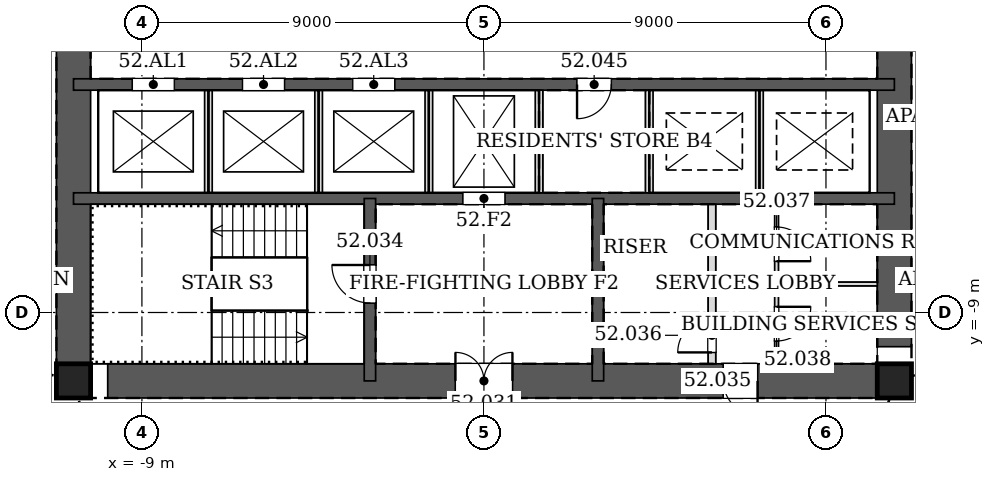
"""IFC4 building model, lengths in metres.
Left out: names, types, materials, properties, quantities, classifications, styles, units other than length and angle.
Written with IfcOpenShell. Run it as: python <this file> out.ifc"""

import sys

from ifc_helpers import new_model, si_unit, direction, frame, frame_2d, origin, origin_2d, place, context, subcontext, project, spatial, rectangle, hollow_rectangle, extrude, element, fill, save


model = new_model("IFC4")
c1 = context("Model", 3, precision=1e-05, world=origin(), true_north=direction((0.0, 1.0)))
c2 = subcontext(c1, "Body", "Model", "MODEL_VIEW")
j1 = project(units=[si_unit("LENGTHUNIT", "METRE"), si_unit("PLANEANGLEUNIT", "RADIAN")], contexts=[c1])
p1 = place(None, origin())
s1 = spatial("IfcSite", under=j1, at=p1, CompositionType="ELEMENT")
p2 = place(p1, origin())
s2 = spatial("IfcBuilding", under=s1, at=p2, CompositionType="ELEMENT")
p3 = place(p2, frame((0.0, 0.0, 224.4)))
s3 = spatial("IfcBuildingStorey", under=s2, at=p3, CompositionType="ELEMENT", Elevation=224.4)
for number, where, z_axis, x_axis in (
    (1, (-10.8, -10.8, 0.0), (0.0, 0.0, 1.0), (1.0, 0.0, 0.0)),
    (2, (10.8, -10.8, 0.0), (0.0, 0.0, 1.0), (1.0, 0.0, 0.0)),
):
    element("IfcColumn", number, at=place(p3, frame(where, z_axis=z_axis, x_axis=x_axis)), inside=s3, PredefinedType="COLUMN", context=c2, shape_type="SweptSolid", body=[
        extrude(hollow_rectangle(XDim=0.9, YDim=0.9, WallThickness=0.05, at=origin_2d()), origin(), (0.0, 0.0, 1.0), 3.4),
    ])
p4 = place(p3, frame((-10.8, -10.8, 0.0), z_axis=(0.0, 0.0, 1.0), x_axis=(1.0, 0.0, 0.0)))
e3 = element("IfcWall", 3, at=p4, inside=s3, PredefinedType="SOLIDWALL", context=c2, shape_type="SweptSolid", body=[
    extrude(rectangle(XDim=21.6, YDim=0.9, at=frame_2d((10.8, 0.0))), origin(), (0.0, 0.0, 1.0), 3.4),
])
p5 = place(p4, frame((10.05, 0.0, 0.0)))
e4 = element("IfcOpeningElement", 4, at=p5, cuts=e3, PredefinedType="OPENING", context=c2, shape_type="SweptSolid", body=[
    extrude(rectangle(XDim=1.5, YDim=2.1, at=frame_2d((0.75, 1.05))), frame((0.0, 0.46, 0.0), z_axis=(0.0, -1.0, 0.0), x_axis=(1.0, 0.0, 0.0)), (0.0, 0.0, 1.0), 0.92),
])
p6 = place(p4, frame((17.1, 0.0, 0.0)))
e5 = element("IfcOpeningElement", 5, at=p6, cuts=e3, PredefinedType="OPENING", context=c2, shape_type="SweptSolid", body=[
    extrude(rectangle(XDim=0.9, YDim=2.1, at=frame_2d((0.45, 1.05))), frame((0.0, 0.46, 0.0), z_axis=(0.0, -1.0, 0.0), x_axis=(1.0, 0.0, 0.0)), (0.0, 0.0, 1.0), 0.92),
])
p7 = place(p3, frame((10.8, -10.8, 0.0), z_axis=(0.0, 0.0, 1.0), x_axis=(0.0, 1.0, 0.0)))
e6 = element("IfcWall", 6, at=p7, inside=s3, PredefinedType="SOLIDWALL", context=c2, shape_type="SweptSolid", body=[
    extrude(rectangle(XDim=21.6, YDim=0.9, at=frame_2d((10.8, 0.0))), origin(), (0.0, 0.0, 1.0), 3.4),
])
p8 = place(p7, frame((11.7, 0.0, 0.0)))
e7 = element("IfcOpeningElement", 7, at=p8, cuts=e6, PredefinedType="OPENING", context=c2, shape_type="SweptSolid", body=[
    extrude(rectangle(XDim=1.2, YDim=2.1, at=frame_2d((0.6, 1.05))), frame((0.0, 0.46, 0.0), z_axis=(0.0, -1.0, 0.0), x_axis=(1.0, 0.0, 0.0)), (0.0, 0.0, 1.0), 0.92),
])
p9 = place(p7, frame((8.7, 0.0, 0.0)))
e8 = element("IfcOpeningElement", 8, at=p9, cuts=e6, PredefinedType="OPENING", context=c2, shape_type="SweptSolid", body=[
    extrude(rectangle(XDim=1.2, YDim=2.1, at=frame_2d((0.6, 1.05))), frame((0.0, 0.46, 0.0), z_axis=(0.0, -1.0, 0.0), x_axis=(1.0, 0.0, 0.0)), (0.0, 0.0, 1.0), 0.92),
])
p10 = place(p3, frame((-10.8, 10.8, 0.0), z_axis=(0.0, 0.0, 1.0), x_axis=(0.0, -1.0, 0.0)))
e9 = element("IfcWall", 9, at=p10, inside=s3, PredefinedType="SOLIDWALL", context=c2, shape_type="SweptSolid", body=[
    extrude(rectangle(XDim=21.6, YDim=0.9, at=frame_2d((10.8, 0.0))), origin(), (0.0, 0.0, 1.0), 3.4),
])
p11 = place(p10, frame((8.7, 0.0, 0.0)))
e10 = element("IfcOpeningElement", 10, at=p11, cuts=e9, PredefinedType="OPENING", context=c2, shape_type="SweptSolid", body=[
    extrude(rectangle(XDim=1.2, YDim=2.1, at=frame_2d((0.6, 1.05))), frame((0.0, 0.46, 0.0), z_axis=(0.0, -1.0, 0.0), x_axis=(1.0, 0.0, 0.0)), (0.0, 0.0, 1.0), 0.92),
])
p12 = place(p10, frame((11.7, 0.0, 0.0)))
e11 = element("IfcOpeningElement", 11, at=p12, cuts=e9, PredefinedType="OPENING", context=c2, shape_type="SweptSolid", body=[
    extrude(rectangle(XDim=1.2, YDim=2.1, at=frame_2d((0.6, 1.05))), frame((0.0, 0.46, 0.0), z_axis=(0.0, -1.0, 0.0), x_axis=(1.0, 0.0, 0.0)), (0.0, 0.0, 1.0), 0.92),
])
p13 = place(p3, frame((-10.8, -3.0, 0.0), z_axis=(0.0, 0.0, 1.0), x_axis=(1.0, 0.0, 0.0)))
e12 = element("IfcWall", 12, at=p13, inside=s3, PredefinedType="SOLIDWALL", context=c2, shape_type="SweptSolid", body=[
    extrude(rectangle(XDim=21.6, YDim=0.3, at=frame_2d((10.8, 0.0))), origin(), (0.0, 0.0, 1.0), 3.4),
])
p14 = place(p13, frame((13.25, 0.0, 0.0)))
e13 = element("IfcOpeningElement", 13, at=p14, cuts=e12, PredefinedType="OPENING", context=c2, shape_type="SweptSolid", body=[
    extrude(rectangle(XDim=0.9, YDim=2.1, at=frame_2d((0.45, 1.05))), frame((0.0, 0.16, 0.0), z_axis=(0.0, -1.0, 0.0), x_axis=(1.0, 0.0, 0.0)), (0.0, 0.0, 1.0), 0.32),
])
p15 = place(p13, frame((1.55, 0.0, 0.0)))
e14 = element("IfcOpeningElement", 14, at=p15, cuts=e12, PredefinedType="OPENING", context=c2, shape_type="SweptSolid", body=[
    extrude(rectangle(XDim=1.1, YDim=2.1, at=frame_2d((0.55, 1.05))), frame((0.0, 0.16, 0.0), z_axis=(0.0, -1.0, 0.0), x_axis=(1.0, 0.0, 0.0)), (0.0, 0.0, 1.0), 0.32),
])
p16 = place(p13, frame((4.45, 0.0, 0.0)))
e15 = element("IfcOpeningElement", 15, at=p16, cuts=e12, PredefinedType="OPENING", context=c2, shape_type="SweptSolid", body=[
    extrude(rectangle(XDim=1.1, YDim=2.1, at=frame_2d((0.55, 1.05))), frame((0.0, 0.16, 0.0), z_axis=(0.0, -1.0, 0.0), x_axis=(1.0, 0.0, 0.0)), (0.0, 0.0, 1.0), 0.32),
])
p17 = place(p13, frame((7.35, 0.0, 0.0)))
e16 = element("IfcOpeningElement", 16, at=p17, cuts=e12, PredefinedType="OPENING", context=c2, shape_type="SweptSolid", body=[
    extrude(rectangle(XDim=1.1, YDim=2.1, at=frame_2d((0.55, 1.05))), frame((0.0, 0.16, 0.0), z_axis=(0.0, -1.0, 0.0), x_axis=(1.0, 0.0, 0.0)), (0.0, 0.0, 1.0), 0.32),
])
p18 = place(p3, frame((-10.8, -6.0, 0.0), z_axis=(0.0, 0.0, 1.0), x_axis=(1.0, 0.0, 0.0)))
e17 = element("IfcWall", 17, at=p18, inside=s3, PredefinedType="SOLIDWALL", context=c2, shape_type="SweptSolid", body=[
    extrude(rectangle(XDim=21.6, YDim=0.3, at=frame_2d((10.8, 0.0))), origin(), (0.0, 0.0, 1.0), 3.4),
])
p19 = place(p18, frame((10.25, 0.0, 0.0)))
e18 = element("IfcOpeningElement", 18, at=p19, cuts=e17, PredefinedType="OPENING", context=c2, shape_type="SweptSolid", body=[
    extrude(rectangle(XDim=1.1, YDim=2.1, at=frame_2d((0.55, 1.05))), frame((0.0, 0.16, 0.0), z_axis=(0.0, -1.0, 0.0), x_axis=(1.0, 0.0, 0.0)), (0.0, 0.0, 1.0), 0.32),
])
p20 = place(p3, frame((-3.0, -6.0, 0.0), z_axis=(0.0, 0.0, 1.0), x_axis=(0.0, -1.0, 0.0)))
e19 = element("IfcWall", 19, at=p20, inside=s3, PredefinedType="SOLIDWALL", context=c2, shape_type="SweptSolid", body=[
    extrude(rectangle(XDim=4.8, YDim=0.3, at=frame_2d((2.4, 0.0))), origin(), (0.0, 0.0, 1.0), 3.4),
])
p21 = place(p20, frame((1.75, 0.0, 0.0)))
e20 = element("IfcOpeningElement", 20, at=p21, cuts=e19, PredefinedType="OPENING", context=c2, shape_type="SweptSolid", body=[
    extrude(rectangle(XDim=1.0, YDim=2.1, at=frame_2d((0.5, 1.05))), frame((0.0, 0.16, 0.0), z_axis=(0.0, -1.0, 0.0), x_axis=(1.0, 0.0, 0.0)), (0.0, 0.0, 1.0), 0.32),
])
p22 = place(p3, frame((3.0, -6.0, 0.0), z_axis=(0.0, 0.0, 1.0), x_axis=(0.0, -1.0, 0.0)))
e21 = element("IfcWall", 21, at=p22, inside=s3, PredefinedType="SOLIDWALL", context=c2, shape_type="SweptSolid", body=[
    extrude(rectangle(XDim=4.8, YDim=0.3, at=frame_2d((2.4, 0.0))), origin(), (0.0, 0.0, 1.0), 3.4),
])
for number, where, z_axis, x_axis in (
    (22, (-7.25, -5.85, 0.0), (0.0, 0.0, 1.0), (0.0, 1.0, 0.0)),
    (23, (-4.35, -5.85, 0.0), (0.0, 0.0, 1.0), (0.0, 1.0, 0.0)),
    (24, (-1.45, -5.85, 0.0), (0.0, 0.0, 1.0), (0.0, 1.0, 0.0)),
):
    element("IfcWall", number, at=place(p3, frame(where, z_axis=z_axis, x_axis=x_axis)), inside=s3, PredefinedType="PARTITIONING", context=c2, shape_type="SweptSolid", body=[
        extrude(rectangle(XDim=2.7, YDim=0.2, at=frame_2d((1.35, 0.0))), origin(), (0.0, 0.0, 1.0), 3.4),
    ])
for number, where, z_axis, x_axis in (
    (25, (1.45, -5.85, 0.0), (0.0, 0.0, 1.0), (0.0, 1.0, 0.0)),
    (26, (4.35, -5.85, 0.0), (0.0, 0.0, 1.0), (0.0, 1.0, 0.0)),
):
    element("IfcWall", number, at=place(p3, frame(where, z_axis=z_axis, x_axis=x_axis)), inside=s3, PredefinedType="PARTITIONING", context=c2, shape_type="SweptSolid", body=[
        extrude(rectangle(XDim=2.7, YDim=0.2, at=frame_2d((1.35, 0.0))), origin(), (0.0, 0.0, 1.0), 3.2),
    ])
p23 = place(p3, frame((7.25, -5.85, 0.0), z_axis=(0.0, 0.0, 1.0), x_axis=(0.0, 1.0, 0.0)))
e27 = element("IfcWall", 27, at=p23, inside=s3, PredefinedType="PARTITIONING", context=c2, shape_type="SweptSolid", body=[
    extrude(rectangle(XDim=2.7, YDim=0.2, at=frame_2d((1.35, 0.0))), origin(), (0.0, 0.0, 1.0), 3.4),
])
p24 = place(p3, frame((6.0, -10.35, 0.0), z_axis=(0.0, 0.0, 1.0), x_axis=(0.0, 1.0, 0.0)))
e28 = element("IfcWall", 28, at=p24, inside=s3, PredefinedType="PARTITIONING", context=c2, shape_type="SweptSolid", body=[
    extrude(rectangle(XDim=4.2, YDim=0.2, at=frame_2d((2.1, 0.0))), origin(), (0.0, 0.0, 1.0), 3.2),
])
p25 = place(p24, frame((0.3, 0.0, 0.0)))
e29 = element("IfcOpeningElement", 29, at=p25, cuts=e28, PredefinedType="OPENING", context=c2, shape_type="SweptSolid", body=[
    extrude(rectangle(XDim=0.9, YDim=2.1, at=frame_2d((0.45, 1.05))), frame((0.0, 0.11, 0.0), z_axis=(0.0, -1.0, 0.0), x_axis=(1.0, 0.0, 0.0)), (0.0, 0.0, 1.0), 0.22),
])
p26 = place(p3, frame((7.7, -10.35, 0.0), z_axis=(0.0, 0.0, 1.0), x_axis=(0.0, 1.0, 0.0)))
e30 = element("IfcWall", 30, at=p26, inside=s3, PredefinedType="PARTITIONING", context=c2, shape_type="SweptSolid", body=[
    extrude(rectangle(XDim=4.2, YDim=0.1, at=frame_2d((2.1, 0.0))), origin(), (0.0, 0.0, 1.0), 3.2),
])
p27 = place(p26, frame((2.7, 0.0, 0.0)))
e31 = element("IfcOpeningElement", 31, at=p27, cuts=e30, PredefinedType="OPENING", context=c2, shape_type="SweptSolid", body=[
    extrude(rectangle(XDim=0.9, YDim=2.1, at=frame_2d((0.45, 1.05))), frame((0.0, 0.06, 0.0), z_axis=(0.0, -1.0, 0.0), x_axis=(1.0, 0.0, 0.0)), (0.0, 0.0, 1.0), 0.12),
])
p28 = place(p26, frame((0.6, 0.0, 0.0)))
e32 = element("IfcOpeningElement", 32, at=p28, cuts=e30, PredefinedType="OPENING", context=c2, shape_type="SweptSolid", body=[
    extrude(rectangle(XDim=0.9, YDim=2.1, at=frame_2d((0.45, 1.05))), frame((0.0, 0.06, 0.0), z_axis=(0.0, -1.0, 0.0), x_axis=(1.0, 0.0, 0.0)), (0.0, 0.0, 1.0), 0.12),
])
p29 = place(p3, frame((7.7, -8.25, 0.0), z_axis=(0.0, 0.0, 1.0), x_axis=(1.0, 0.0, 0.0)))
e33 = element("IfcWall", 33, at=p29, inside=s3, PredefinedType="PARTITIONING", context=c2, shape_type="SweptSolid", body=[
    extrude(rectangle(XDim=2.65, YDim=0.1, at=frame_2d((1.325, 0.0))), origin(), (0.0, 0.0, 1.0), 3.2),
])
p30 = place(p5, origin())
e34 = element("IfcDoor", 34, at=p30, inside=s3, OperationType="DOUBLE_DOOR_SINGLE_SWING", PredefinedType="DOOR", context=c2, shape_type="SweptSolid", body=[
    extrude(rectangle(XDim=1.5, YDim=2.1, at=frame_2d((0.75, 1.05))), frame((0.0, 0.025, 0.0), z_axis=(0.0, -1.0, 0.0), x_axis=(1.0, 0.0, 0.0)), (0.0, 0.0, 1.0), 0.05),
])
fill(e4, e34)
p31 = place(p21, frame((1.0, 0.0, 0.0), z_axis=(0.0, 0.0, 1.0), x_axis=(-1.0, 0.0, 0.0)))
e35 = element("IfcDoor", 35, at=p31, inside=s3, OperationType="SINGLE_SWING_RIGHT", PredefinedType="DOOR", context=c2, shape_type="SweptSolid", body=[
    extrude(rectangle(XDim=1.0, YDim=2.1, at=frame_2d((0.5, 1.05))), frame((0.0, 0.025, 0.0), z_axis=(0.0, -1.0, 0.0), x_axis=(1.0, 0.0, 0.0)), (0.0, 0.0, 1.0), 0.05),
])
fill(e20, e35)
p32 = place(p6, frame((0.9, 0.0, 0.0), z_axis=(0.0, 0.0, 1.0), x_axis=(-1.0, 0.0, 0.0)))
e36 = element("IfcDoor", 36, at=p32, inside=s3, OperationType="SINGLE_SWING_LEFT", PredefinedType="DOOR", context=c2, shape_type="SweptSolid", body=[
    extrude(rectangle(XDim=0.9, YDim=2.1, at=frame_2d((0.45, 1.05))), frame((0.0, 0.025, 0.0), z_axis=(0.0, -1.0, 0.0), x_axis=(1.0, 0.0, 0.0)), (0.0, 0.0, 1.0), 0.05),
])
fill(e5, e36)
p33 = place(p25, origin())
e37 = element("IfcDoor", 37, at=p33, inside=s3, OperationType="SINGLE_SWING_LEFT", PredefinedType="DOOR", context=c2, shape_type="SweptSolid", body=[
    extrude(rectangle(XDim=0.9, YDim=2.1, at=frame_2d((0.45, 1.05))), frame((0.0, 0.025, 0.0), z_axis=(0.0, -1.0, 0.0), x_axis=(1.0, 0.0, 0.0)), (0.0, 0.0, 1.0), 0.05),
])
fill(e29, e37)
p34 = place(p27, frame((0.9, 0.0, 0.0), z_axis=(0.0, 0.0, 1.0), x_axis=(-1.0, 0.0, 0.0)))
e38 = element("IfcDoor", 38, at=p34, inside=s3, OperationType="SINGLE_SWING_RIGHT", PredefinedType="DOOR", context=c2, shape_type="SweptSolid", body=[
    extrude(rectangle(XDim=0.9, YDim=2.1, at=frame_2d((0.45, 1.05))), frame((0.0, 0.025, 0.0), z_axis=(0.0, -1.0, 0.0), x_axis=(1.0, 0.0, 0.0)), (0.0, 0.0, 1.0), 0.05),
])
fill(e31, e38)
p35 = place(p28, frame((0.9, 0.0, 0.0), z_axis=(0.0, 0.0, 1.0), x_axis=(-1.0, 0.0, 0.0)))
e39 = element("IfcDoor", 39, at=p35, inside=s3, OperationType="SINGLE_SWING_LEFT", PredefinedType="DOOR", context=c2, shape_type="SweptSolid", body=[
    extrude(rectangle(XDim=0.9, YDim=2.1, at=frame_2d((0.45, 1.05))), frame((0.0, 0.025, 0.0), z_axis=(0.0, -1.0, 0.0), x_axis=(1.0, 0.0, 0.0)), (0.0, 0.0, 1.0), 0.05),
])
fill(e32, e39)
p36 = place(p14, frame((0.9, 0.0, 0.0), z_axis=(0.0, 0.0, 1.0), x_axis=(-1.0, 0.0, 0.0)))
e40 = element("IfcDoor", 40, at=p36, inside=s3, OperationType="SINGLE_SWING_RIGHT", PredefinedType="DOOR", context=c2, shape_type="SweptSolid", body=[
    extrude(rectangle(XDim=0.9, YDim=2.1, at=frame_2d((0.45, 1.05))), frame((0.0, 0.025, 0.0), z_axis=(0.0, -1.0, 0.0), x_axis=(1.0, 0.0, 0.0)), (0.0, 0.0, 1.0), 0.05),
])
fill(e13, e40)
p37 = place(p19, origin())
e41 = element("IfcDoor", 41, at=p37, inside=s3, OperationType="DOUBLE_DOOR_SLIDING", PredefinedType="DOOR", context=c2, shape_type="SweptSolid", body=[
    extrude(rectangle(XDim=1.1, YDim=2.1, at=frame_2d((0.55, 1.05))), frame((0.0, 0.025, 0.0), z_axis=(0.0, -1.0, 0.0), x_axis=(1.0, 0.0, 0.0)), (0.0, 0.0, 1.0), 0.05),
])
fill(e18, e41)
p38 = place(p15, origin())
e42 = element("IfcDoor", 42, at=p38, inside=s3, OperationType="DOUBLE_DOOR_SLIDING", PredefinedType="DOOR", context=c2, shape_type="SweptSolid", body=[
    extrude(rectangle(XDim=1.1, YDim=2.1, at=frame_2d((0.55, 1.05))), frame((0.0, 0.025, 0.0), z_axis=(0.0, -1.0, 0.0), x_axis=(1.0, 0.0, 0.0)), (0.0, 0.0, 1.0), 0.05),
])
fill(e14, e42)
p39 = place(p16, origin())
e43 = element("IfcDoor", 43, at=p39, inside=s3, OperationType="DOUBLE_DOOR_SLIDING", PredefinedType="DOOR", context=c2, shape_type="SweptSolid", body=[
    extrude(rectangle(XDim=1.1, YDim=2.1, at=frame_2d((0.55, 1.05))), frame((0.0, 0.025, 0.0), z_axis=(0.0, -1.0, 0.0), x_axis=(1.0, 0.0, 0.0)), (0.0, 0.0, 1.0), 0.05),
])
fill(e15, e43)
p40 = place(p17, origin())
e44 = element("IfcDoor", 44, at=p40, inside=s3, OperationType="DOUBLE_DOOR_SLIDING", PredefinedType="DOOR", context=c2, shape_type="SweptSolid", body=[
    extrude(rectangle(XDim=1.1, YDim=2.1, at=frame_2d((0.55, 1.05))), frame((0.0, 0.025, 0.0), z_axis=(0.0, -1.0, 0.0), x_axis=(1.0, 0.0, 0.0)), (0.0, 0.0, 1.0), 0.05),
])
fill(e16, e44)
save(model, sys.argv[1])
